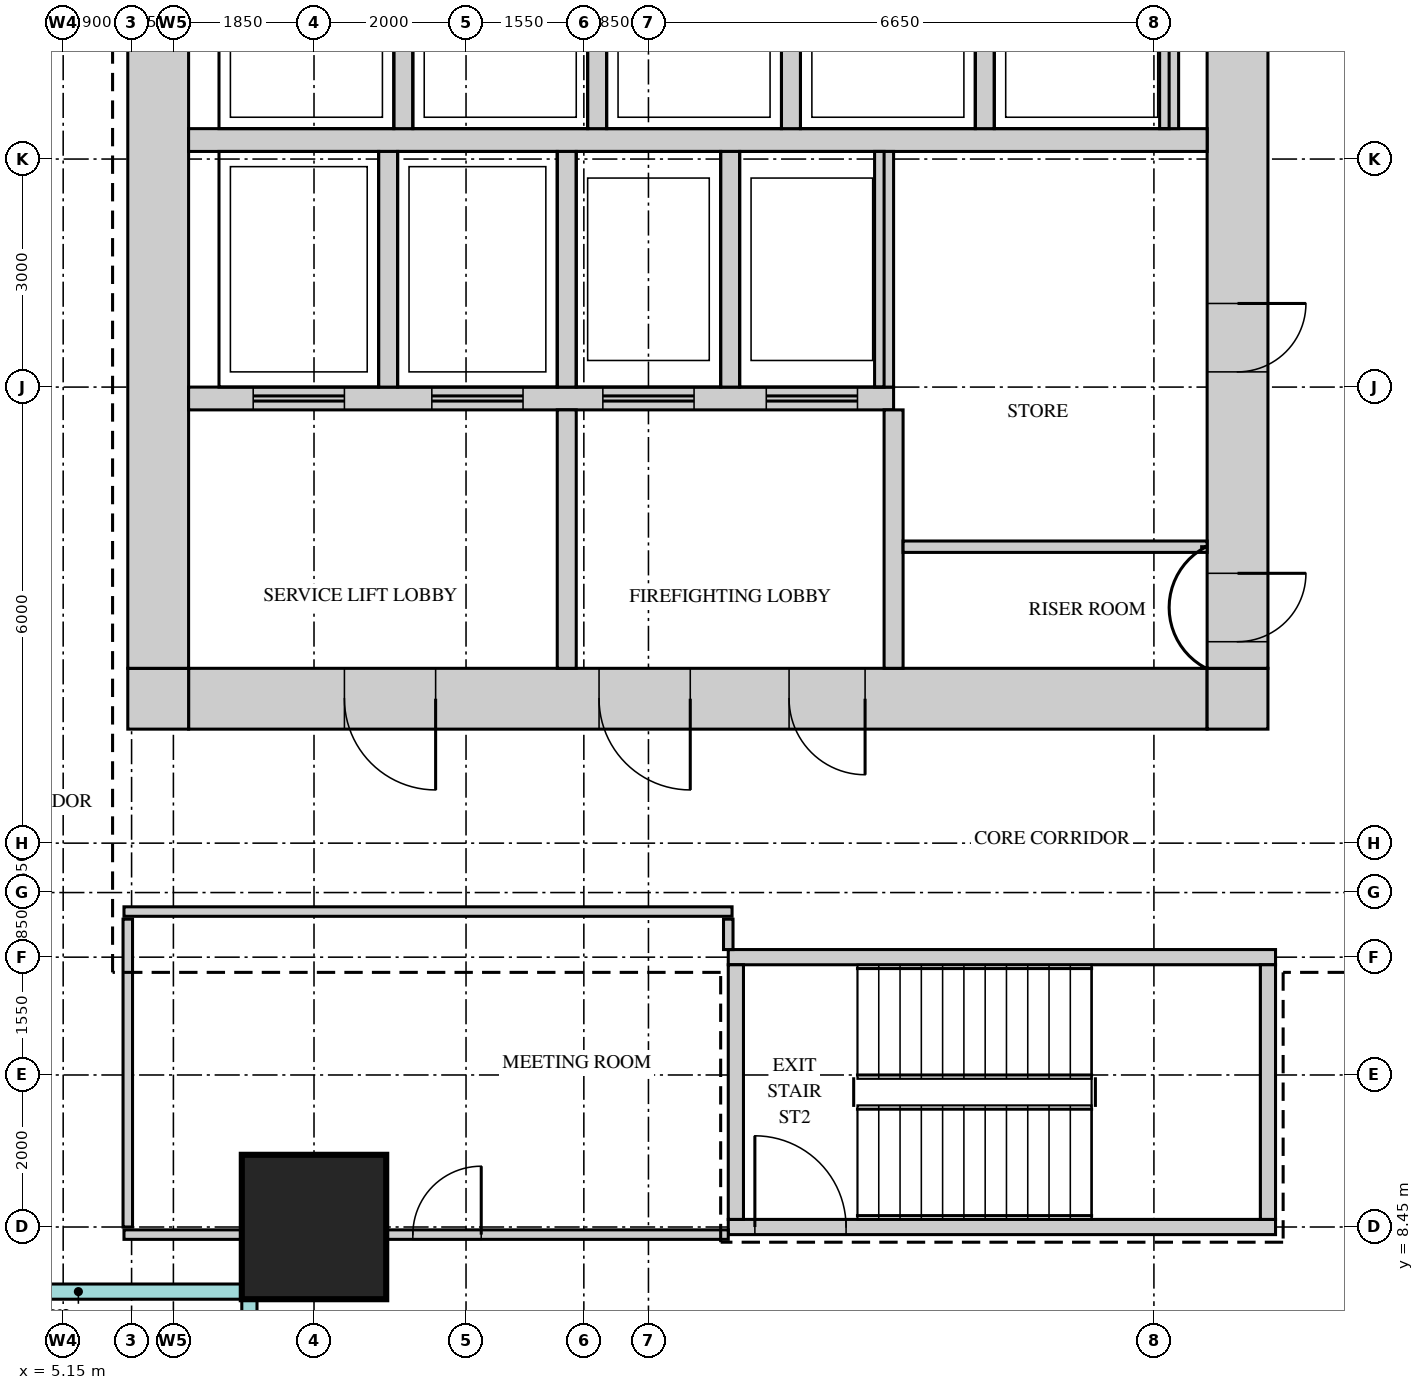
"""IFC4 building model, lengths in metres.
Left out: names, types, materials, properties, quantities, classifications, styles, units other than length and angle.
Written with IfcOpenShell. Run it as: python <this file> out.ifc"""

import sys

from ifc_helpers import new_model, si_unit, direction, frame, frame_2d, origin, origin_2d, place, context, subcontext, project, spatial, rectangle, extrude, source, transform, mapped, element, fill, save


model = new_model("IFC4")
c1 = context("Model", 3, precision=1e-05, world=origin(), true_north=direction((0.0, 1.0)))
c2 = subcontext(c1, "Body", "Model", "MODEL_VIEW")
j1 = project(units=[si_unit("LENGTHUNIT", "METRE"), si_unit("PLANEANGLEUNIT", "RADIAN")], contexts=[c1])
p1 = place(None, origin())
s1 = spatial("IfcSite", under=j1, at=p1, CompositionType="ELEMENT")
p2 = place(p1, origin())
s2 = spatial("IfcBuilding", under=s1, at=p2, CompositionType="ELEMENT")
p3 = place(p2, frame((0.0, 0.0, 184.7)))
s3 = spatial("IfcBuildingStorey", under=s2, at=p3, CompositionType="ELEMENT", Elevation=184.7)
m1 = source(origin(), c2, "Body", "SweptSolid", [
    extrude(rectangle(XDim=13.4, YDim=0.8, at=frame_2d((6.7, 0.0))), origin(), (0.0, 0.0, 1.0), 3.75),
])
p4 = place(p3, frame((6.8, 15.4, 0.0), z_axis=(0.0, 0.0, 1.0), x_axis=(1.0, 0.0, 0.0)))
e1 = element("IfcWall", 1, at=p4, inside=s3, PredefinedType="SHEAR", context=c2, shape_type="MappedRepresentation", body=[
    mapped(m1, transform((0.0, 0.0, 0.0))),
])
m2 = source(origin(), c2, "Body", "SweptSolid", [
    extrude(rectangle(XDim=1.2, YDim=2.1, at=frame_2d((0.6, 1.05))), frame((0.0, 0.41, 0.0), z_axis=(0.0, -1.0, 0.0), x_axis=(1.0, 0.0, 0.0)), (0.0, 0.0, 1.0), 0.82),
])
p5 = place(p4, frame((5.4, 0.0, 0.0)))
e2 = element("IfcOpeningElement", 2, at=p5, cuts=e1, PredefinedType="OPENING", context=c2, shape_type="MappedRepresentation", body=[
    mapped(m2, transform((0.0, 0.0, 0.0))),
])
p6 = place(p4, frame((2.05, 0.0, 0.0)))
e3 = element("IfcOpeningElement", 3, at=p6, cuts=e1, PredefinedType="OPENING", context=c2, shape_type="MappedRepresentation", body=[
    mapped(m2, transform((0.0, 0.0, 0.0))),
])
m3 = source(origin(), c2, "Body", "SweptSolid", [
    extrude(rectangle(XDim=1.0, YDim=2.1, at=frame_2d((0.5, 1.05))), frame((0.0, 0.41, 0.0), z_axis=(0.0, -1.0, 0.0), x_axis=(1.0, 0.0, 0.0)), (0.0, 0.0, 1.0), 0.82),
])
p7 = place(p4, frame((7.9, 0.0, 0.0)))
e4 = element("IfcOpeningElement", 4, at=p7, cuts=e1, PredefinedType="OPENING", context=c2, shape_type="MappedRepresentation", body=[
    mapped(m3, transform((0.0, 0.0, 0.0))),
])
m4 = source(origin(), c2, "Body", "SweptSolid", [
    extrude(rectangle(XDim=0.8, YDim=0.8, at=frame_2d((0.4, 0.0))), origin(), (0.0, 0.0, 1.0), 3.75),
])
for number, where, z_axis, x_axis in (
    (5, (20.2, 15.4, 0.0), (0.0, 0.0, 1.0), (1.0, 0.0, 0.0)),
    (6, (6.0, 15.4, 0.0), (0.0, 0.0, 1.0), (1.0, 0.0, 0.0)),
):
    element("IfcWall", number, at=place(p3, frame(where, z_axis=z_axis, x_axis=x_axis)), inside=s3, PredefinedType="SHEAR", context=c2, shape_type="MappedRepresentation", body=[
        mapped(m4, transform((0.0, 0.0, 0.0))),
    ])
m5 = source(origin(), c2, "Body", "SweptSolid", [
    extrude(rectangle(XDim=22.4, YDim=0.8, at=frame_2d((11.2, 0.0))), origin(), (0.0, 0.0, 1.0), 3.75),
])
p8 = place(p3, frame((20.6, 15.8, 0.0), z_axis=(0.0, 0.0, 1.0), x_axis=(0.0, 1.0, 0.0)))
e7 = element("IfcWall", 7, at=p8, inside=s3, PredefinedType="SHEAR", context=c2, shape_type="MappedRepresentation", body=[
    mapped(m5, transform((0.0, 0.0, 0.0))),
])
m6 = source(origin(), c2, "Body", "SweptSolid", [
    extrude(rectangle(XDim=1.8, YDim=2.1, at=frame_2d((0.9, 1.05))), frame((0.0, 0.41, 0.0), z_axis=(0.0, -1.0, 0.0), x_axis=(1.0, 0.0, 0.0)), (0.0, 0.0, 1.0), 0.82),
])
p9 = place(p8, frame((10.7, 0.0, 0.0)))
e8 = element("IfcOpeningElement", 8, at=p9, cuts=e7, PredefinedType="OPENING", context=c2, shape_type="MappedRepresentation", body=[
    mapped(m6, transform((0.0, 0.0, 0.0))),
])
m7 = source(origin(), c2, "Body", "SweptSolid", [
    extrude(rectangle(XDim=0.9, YDim=2.1, at=frame_2d((0.45, 1.05))), frame((0.0, 0.41, 0.0), z_axis=(0.0, -1.0, 0.0), x_axis=(1.0, 0.0, 0.0)), (0.0, 0.0, 1.0), 0.82),
])
p10 = place(p8, frame((0.35, 0.0, 0.0)))
e9 = element("IfcOpeningElement", 9, at=p10, cuts=e7, PredefinedType="OPENING", context=c2, shape_type="MappedRepresentation", body=[
    mapped(m7, transform((0.0, 0.0, 0.0))),
])
p11 = place(p8, frame((3.9, 0.0, 0.0)))
e10 = element("IfcOpeningElement", 10, at=p11, cuts=e7, PredefinedType="OPENING", context=c2, shape_type="MappedRepresentation", body=[
    mapped(m7, transform((0.0, 0.0, 0.0))),
])
p12 = place(p3, frame((6.4, 15.8, 0.0), z_axis=(0.0, 0.0, 1.0), x_axis=(0.0, 1.0, 0.0)))
e11 = element("IfcWall", 11, at=p12, inside=s3, PredefinedType="SHEAR", context=c2, shape_type="MappedRepresentation", body=[
    mapped(m5, transform((0.0, 0.0, 0.0))),
])
m8 = source(origin(), c2, "Body", "SweptSolid", [
    extrude(rectangle(XDim=7.2, YDim=0.2, at=frame_2d((3.6, 0.0))), origin(), (0.0, 0.0, 1.0), 3.75),
])
p13 = place(p3, frame((13.9, 12.0, 0.0), z_axis=(0.0, 0.0, 1.0), x_axis=(1.0, 0.0, 0.0)))
e12 = element("IfcWall", 12, at=p13, inside=s3, PredefinedType="SHEAR", context=c2, shape_type="MappedRepresentation", body=[
    mapped(m8, transform((0.0, 0.0, 0.0))),
])
p14 = place(p3, frame((13.9, 8.45, 0.0), z_axis=(0.0, 0.0, 1.0), x_axis=(1.0, 0.0, 0.0)))
e13 = element("IfcWall", 13, at=p14, inside=s3, PredefinedType="SHEAR", context=c2, shape_type="MappedRepresentation", body=[
    mapped(m8, transform((0.0, 0.0, 0.0))),
])
m9 = source(origin(), c2, "Body", "SweptSolid", [
    extrude(rectangle(XDim=1.2, YDim=2.1, at=frame_2d((0.6, 1.05))), frame((0.0, 0.11, 0.0), z_axis=(0.0, -1.0, 0.0), x_axis=(1.0, 0.0, 0.0)), (0.0, 0.0, 1.0), 0.22),
])
p15 = place(p14, frame((0.35, 0.0, 0.0)))
e14 = element("IfcOpeningElement", 14, at=p15, cuts=e13, PredefinedType="OPENING", context=c2, shape_type="MappedRepresentation", body=[
    mapped(m9, transform((0.0, 0.0, 0.0))),
])
m10 = source(origin(), c2, "Body", "SweptSolid", [
    extrude(rectangle(XDim=3.35, YDim=0.2, at=frame_2d((1.675, 0.0))), origin(), (0.0, 0.0, 1.0), 3.75),
])
for number, where, z_axis, x_axis in (
    (15, (21.0, 8.55, 0.0), (0.0, 0.0, 1.0), (0.0, 1.0, 0.0)),
    (16, (14.0, 8.55, 0.0), (0.0, 0.0, 1.0), (0.0, 1.0, 0.0)),
):
    element("IfcWall", number, at=place(p3, frame(where, z_axis=z_axis, x_axis=x_axis)), inside=s3, PredefinedType="SHEAR", context=c2, shape_type="MappedRepresentation", body=[
        mapped(m10, transform((0.0, 0.0, 0.0))),
    ])
m11 = source(origin(), c2, "Body", "SweptSolid", [
    extrude(rectangle(XDim=13.4, YDim=0.3, at=frame_2d((6.7, 0.0))), origin(), (0.0, 0.0, 1.0), 3.75),
])
p16 = place(p3, frame((6.8, 22.75, 0.0), z_axis=(0.0, 0.0, 1.0), x_axis=(1.0, 0.0, 0.0)))
e17 = element("IfcWall", 17, at=p16, inside=s3, PredefinedType="STANDARD", context=c2, shape_type="MappedRepresentation", body=[
    mapped(m11, transform((0.0, 0.0, 0.0))),
])
m12 = source(origin(), c2, "Body", "SweptSolid", [
    extrude(rectangle(XDim=9.275, YDim=0.3, at=frame_2d((4.637, 0.0))), origin(), (0.0, 0.0, 1.0), 3.75),
])
p17 = place(p3, frame((6.8, 19.35, 0.0), z_axis=(0.0, 0.0, 1.0), x_axis=(1.0, 0.0, 0.0)))
e18 = element("IfcWall", 18, at=p17, inside=s3, PredefinedType="STANDARD", context=c2, shape_type="MappedRepresentation", body=[
    mapped(m12, transform((0.0, 0.0, 0.0))),
])
m13 = source(origin(), c2, "Body", "SweptSolid", [
    extrude(rectangle(XDim=1.2, YDim=2.1, at=frame_2d((0.6, 1.05))), frame((0.0, 0.16, 0.0), z_axis=(0.0, -1.0, 0.0), x_axis=(1.0, 0.0, 0.0)), (0.0, 0.0, 1.0), 0.32),
])
p18 = place(p17, frame((0.85, 0.0, 0.0)))
e19 = element("IfcOpeningElement", 19, at=p18, cuts=e18, PredefinedType="OPENING", context=c2, shape_type="MappedRepresentation", body=[
    mapped(m13, transform((0.0, 0.0, 0.0))),
])
p19 = place(p17, frame((3.2, 0.0, 0.0)))
e20 = element("IfcOpeningElement", 20, at=p19, cuts=e18, PredefinedType="OPENING", context=c2, shape_type="MappedRepresentation", body=[
    mapped(m13, transform((0.0, 0.0, 0.0))),
])
p20 = place(p17, frame((5.45, 0.0, 0.0)))
e21 = element("IfcOpeningElement", 21, at=p20, cuts=e18, PredefinedType="OPENING", context=c2, shape_type="MappedRepresentation", body=[
    mapped(m13, transform((0.0, 0.0, 0.0))),
])
p21 = place(p17, frame((7.6, 0.0, 0.0)))
e22 = element("IfcOpeningElement", 22, at=p21, cuts=e18, PredefinedType="OPENING", context=c2, shape_type="MappedRepresentation", body=[
    mapped(m13, transform((0.0, 0.0, 0.0))),
])
m14 = source(origin(), c2, "Body", "SweptSolid", [
    extrude(rectangle(XDim=3.1, YDim=0.25, at=frame_2d((1.55, 0.0))), origin(), (0.0, 0.0, 1.0), 3.75),
])
for number, where, z_axis, x_axis in (
    (23, (9.425, 19.5, 0.0), (0.0, 0.0, 1.0), (0.0, 1.0, 0.0)),
    (24, (11.775, 19.5, 0.0), (0.0, 0.0, 1.0), (0.0, 1.0, 0.0)),
    (25, (13.925, 19.5, 0.0), (0.0, 0.0, 1.0), (0.0, 1.0, 0.0)),
    (26, (15.95, 19.5, 0.0), (0.0, 0.0, 1.0), (0.0, 1.0, 0.0)),
):
    element("IfcWall", number, at=place(p3, frame(where, z_axis=z_axis, x_axis=x_axis)), inside=s3, PredefinedType="STANDARD", context=c2, shape_type="MappedRepresentation", body=[
        mapped(m14, transform((0.0, 0.0, 0.0))),
    ])
m15 = source(origin(), c2, "Body", "SweptSolid", [
    extrude(rectangle(XDim=2.4, YDim=0.25, at=frame_2d((1.2, 0.0))), origin(), (0.0, 0.0, 1.0), 3.75),
])
for number, where, z_axis, x_axis in (
    (27, (17.275, 22.9, 0.0), (0.0, 0.0, 1.0), (0.0, 1.0, 0.0)),
    (28, (19.7, 22.9, 0.0), (0.0, 0.0, 1.0), (0.0, 1.0, 0.0)),
    (29, (9.625, 22.9, 0.0), (0.0, 0.0, 1.0), (0.0, 1.0, 0.0)),
    (30, (12.175, 22.9, 0.0), (0.0, 0.0, 1.0), (0.0, 1.0, 0.0)),
    (31, (14.725, 22.9, 0.0), (0.0, 0.0, 1.0), (0.0, 1.0, 0.0)),
):
    element("IfcWall", number, at=place(p3, frame(where, z_axis=z_axis, x_axis=x_axis)), inside=s3, PredefinedType="STANDARD", context=c2, shape_type="MappedRepresentation", body=[
        mapped(m15, transform((0.0, 0.0, 0.0))),
    ])
m16 = source(origin(), c2, "Body", "SweptSolid", [
    extrude(rectangle(XDim=3.4, YDim=0.25, at=frame_2d((1.7, 0.0))), origin(), (0.0, 0.0, 1.0), 3.75),
])
for number, where, z_axis, x_axis in (
    (32, (16.075, 15.8, 0.0), (0.0, 0.0, 1.0), (0.0, 1.0, 0.0)),
    (33, (11.775, 15.8, 0.0), (0.0, 0.0, 1.0), (0.0, 1.0, 0.0)),
):
    element("IfcWall", number, at=place(p3, frame(where, z_axis=z_axis, x_axis=x_axis)), inside=s3, PredefinedType="STANDARD", context=c2, shape_type="MappedRepresentation", body=[
        mapped(m16, transform((0.0, 0.0, 0.0))),
    ])
m17 = source(origin(), c2, "Body", "SweptSolid", [
    extrude(rectangle(XDim=1.9, YDim=1.9, at=origin_2d()), origin(), (0.0, 0.0, 1.0), 4.0),
])
p22 = place(p3, frame((8.45, 8.45, 0.0), z_axis=(0.0, 0.0, 1.0), x_axis=(1.0, 0.0, 0.0)))
e34 = element("IfcColumn", 34, at=p22, inside=s3, PredefinedType="COLUMN", context=c2, shape_type="MappedRepresentation", body=[
    mapped(m17, transform((0.0, 0.0, 0.0))),
])
m18 = source(origin(), c2, "Body", "SweptSolid", [
    extrude(rectangle(XDim=7.95, YDim=0.125, at=frame_2d((3.975, 0.0))), origin(), (0.0, 0.0, 1.0), 3.25),
])
p23 = place(p3, frame((5.95, 8.35, 0.0), z_axis=(0.0, 0.0, 1.0), x_axis=(1.0, 0.0, 0.0)))
e35 = element("IfcWall", 35, at=p23, inside=s3, PredefinedType="PARTITIONING", context=c2, shape_type="MappedRepresentation", body=[
    mapped(m18, transform((0.0, 0.0, 0.0))),
])
m19 = source(origin(), c2, "Body", "SweptSolid", [
    extrude(rectangle(XDim=0.9, YDim=2.1, at=frame_2d((0.45, 1.05))), frame((0.0, 0.073, 0.0), z_axis=(0.0, -1.0, 0.0), x_axis=(1.0, 0.0, 0.0)), (0.0, 0.0, 1.0), 0.145),
])
p24 = place(p23, frame((3.8, 0.0, 0.0)))
e36 = element("IfcOpeningElement", 36, at=p24, cuts=e35, PredefinedType="OPENING", context=c2, shape_type="MappedRepresentation", body=[
    mapped(m19, transform((0.0, 0.0, 0.0))),
])
m20 = source(origin(), c2, "Body", "SweptSolid", [
    extrude(rectangle(XDim=4.05, YDim=0.125, at=frame_2d((2.025, 0.0))), origin(), (0.0, 0.0, 1.0), 3.8),
])
p25 = place(p3, frame((6.0, 8.45, 0.0), z_axis=(0.0, 0.0, 1.0), x_axis=(0.0, 1.0, 0.0)))
e37 = element("IfcWall", 37, at=p25, inside=s3, PredefinedType="PARTITIONING", context=c2, shape_type="MappedRepresentation", body=[
    mapped(m20, transform((0.0, 0.0, 0.0))),
])
m21 = source(origin(), c2, "Body", "SweptSolid", [
    extrude(rectangle(XDim=0.4, YDim=0.125, at=frame_2d((0.2, 0.0))), origin(), (0.0, 0.0, 1.0), 3.8),
])
p26 = place(p3, frame((13.9, 12.1, 0.0), z_axis=(0.0, 0.0, 1.0), x_axis=(0.0, 1.0, 0.0)))
e38 = element("IfcWall", 38, at=p26, inside=s3, PredefinedType="PARTITIONING", context=c2, shape_type="MappedRepresentation", body=[
    mapped(m21, transform((0.0, 0.0, 0.0))),
])
m22 = source(origin(), c2, "Body", "SweptSolid", [
    extrude(rectangle(XDim=8.0, YDim=0.125, at=frame_2d((4.0, 0.0))), origin(), (0.0, 0.0, 1.0), 3.8),
])
p27 = place(p3, frame((5.95, 12.6, 0.0), z_axis=(0.0, 0.0, 1.0), x_axis=(1.0, 0.0, 0.0)))
e39 = element("IfcWall", 39, at=p27, inside=s3, PredefinedType="PARTITIONING", context=c2, shape_type="MappedRepresentation", body=[
    mapped(m22, transform((0.0, 0.0, 0.0))),
])
m23 = source(origin(), c2, "Body", "SweptSolid", [
    extrude(rectangle(XDim=4.0, YDim=0.15, at=frame_2d((2.0, 0.0))), origin(), (0.0, 0.0, 1.0), 3.8),
])
p28 = place(p3, frame((16.2, 17.4, 0.0), z_axis=(0.0, 0.0, 1.0), x_axis=(1.0, 0.0, 0.0)))
e40 = element("IfcWall", 40, at=p28, inside=s3, PredefinedType="PARTITIONING", context=c2, shape_type="MappedRepresentation", body=[
    mapped(m23, transform((0.0, 0.0, 0.0))),
])
m24 = source(origin(), c2, "Body", "SweptSolid", [
    extrude(rectangle(XDim=0.9, YDim=2.1, at=frame_2d((0.45, 1.05))), frame((0.0, 0.35, 0.0), z_axis=(0.0, -1.0, 0.0), x_axis=(1.0, 0.0, 0.0)), (0.0, 0.0, 1.0), 0.7),
])
p29 = place(p10, origin())
e41 = element("IfcDoor", 41, at=p29, inside=s3, OperationType="SINGLE_SWING_RIGHT", PredefinedType="DOOR", context=c2, shape_type="MappedRepresentation", body=[
    mapped(m24, transform((0.0, 0.0, 0.0))),
])
fill(e9, e41)
p30 = place(p11, origin())
e42 = element("IfcDoor", 42, at=p30, inside=s3, OperationType="SINGLE_SWING_RIGHT", PredefinedType="DOOR", context=c2, shape_type="MappedRepresentation", body=[
    mapped(m24, transform((0.0, 0.0, 0.0))),
])
fill(e10, e42)
m25 = source(origin(), c2, "Body", "SweptSolid", [
    extrude(rectangle(XDim=1.2, YDim=2.1, at=frame_2d((0.6, 1.05))), frame((0.0, 0.35, 0.0), z_axis=(0.0, -1.0, 0.0), x_axis=(1.0, 0.0, 0.0)), (0.0, 0.0, 1.0), 0.7),
])
p31 = place(p5, origin())
e43 = element("IfcDoor", 43, at=p31, inside=s3, OperationType="SINGLE_SWING_RIGHT", PredefinedType="DOOR", context=c2, shape_type="MappedRepresentation", body=[
    mapped(m25, transform((0.0, 0.0, 0.0))),
])
fill(e2, e43)
p32 = place(p6, origin())
e44 = element("IfcDoor", 44, at=p32, inside=s3, OperationType="SINGLE_SWING_RIGHT", PredefinedType="DOOR", context=c2, shape_type="MappedRepresentation", body=[
    mapped(m25, transform((0.0, 0.0, 0.0))),
])
fill(e3, e44)
m26 = source(origin(), c2, "Body", "SweptSolid", [
    extrude(rectangle(XDim=1.0, YDim=2.1, at=frame_2d((0.5, 1.05))), frame((0.0, 0.35, 0.0), z_axis=(0.0, -1.0, 0.0), x_axis=(1.0, 0.0, 0.0)), (0.0, 0.0, 1.0), 0.7),
])
p33 = place(p7, origin())
e45 = element("IfcDoor", 45, at=p33, inside=s3, OperationType="SINGLE_SWING_RIGHT", PredefinedType="DOOR", context=c2, shape_type="MappedRepresentation", body=[
    mapped(m26, transform((0.0, 0.0, 0.0))),
])
fill(e4, e45)
m27 = source(origin(), c2, "Body", "SweptSolid", [
    extrude(rectangle(XDim=0.9, YDim=2.1, at=frame_2d((0.45, 1.05))), frame((0.0, 0.025, 0.0), z_axis=(0.0, -1.0, 0.0), x_axis=(1.0, 0.0, 0.0)), (0.0, 0.0, 1.0), 0.05),
])
p34 = place(p24, origin())
e46 = element("IfcDoor", 46, at=p34, inside=s3, OperationType="SINGLE_SWING_LEFT", PredefinedType="DOOR", context=c2, shape_type="MappedRepresentation", body=[
    mapped(m27, transform((0.0, 0.0, 0.0))),
])
fill(e36, e46)
m28 = source(origin(), c2, "Body", "SweptSolid", [
    extrude(rectangle(XDim=1.2, YDim=2.1, at=frame_2d((0.6, 1.05))), frame((0.0, 0.025, 0.0), z_axis=(0.0, -1.0, 0.0), x_axis=(1.0, 0.0, 0.0)), (0.0, 0.0, 1.0), 0.05),
])
p35 = place(p15, origin())
e47 = element("IfcDoor", 47, at=p35, inside=s3, OperationType="SINGLE_SWING_RIGHT", PredefinedType="DOOR", context=c2, shape_type="MappedRepresentation", body=[
    mapped(m28, transform((0.0, 0.0, 0.0))),
])
fill(e14, e47)
p36 = place(p18, origin())
e48 = element("IfcDoor", 48, at=p36, inside=s3, OperationType="DOUBLE_DOOR_SLIDING", PredefinedType="DOOR", context=c2, shape_type="MappedRepresentation", body=[
    mapped(m28, transform((0.0, 0.0, 0.0))),
])
fill(e19, e48)
p37 = place(p19, origin())
e49 = element("IfcDoor", 49, at=p37, inside=s3, OperationType="DOUBLE_DOOR_SLIDING", PredefinedType="DOOR", context=c2, shape_type="MappedRepresentation", body=[
    mapped(m28, transform((0.0, 0.0, 0.0))),
])
fill(e20, e49)
p38 = place(p20, origin())
e50 = element("IfcDoor", 50, at=p38, inside=s3, OperationType="DOUBLE_DOOR_SLIDING", PredefinedType="DOOR", context=c2, shape_type="MappedRepresentation", body=[
    mapped(m28, transform((0.0, 0.0, 0.0))),
])
fill(e21, e50)
p39 = place(p21, origin())
e51 = element("IfcDoor", 51, at=p39, inside=s3, OperationType="DOUBLE_DOOR_SLIDING", PredefinedType="DOOR", context=c2, shape_type="MappedRepresentation", body=[
    mapped(m28, transform((0.0, 0.0, 0.0))),
])
fill(e22, e51)
save(model, sys.argv[1])
